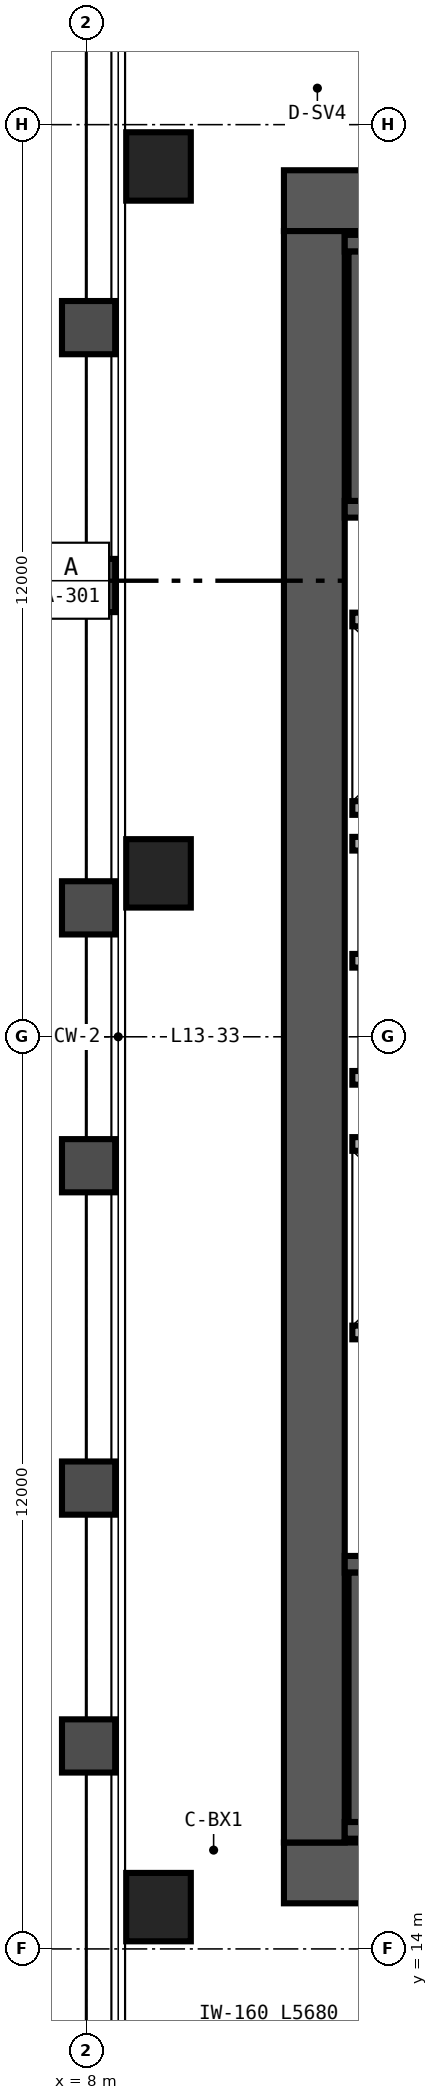
"""IFC4 building model, lengths in metres.
Left out: names, types, materials, properties, quantities, classifications, styles, units other than length and angle.
Written with IfcOpenShell. Run it as: python <this file> out.ifc"""

import sys

from ifc_helpers import new_model, si_unit, direction, frame, frame_2d, origin, origin_2d, place, context, subcontext, project, spatial, rectangle, hollow_rectangle, extrude, source, transform, mapped, element, save


model = new_model("IFC4")
c1 = context("Model", 3, precision=1e-05, world=origin(), true_north=direction((0.0, 1.0)))
c2 = subcontext(c1, "Body", "Model", "MODEL_VIEW")
j1 = project(units=[si_unit("LENGTHUNIT", "METRE"), si_unit("PLANEANGLEUNIT", "RADIAN")], contexts=[c1])
p1 = place(None, origin())
s1 = spatial("IfcSite", under=j1, at=p1, CompositionType="ELEMENT")
p2 = place(p1, origin())
s2 = spatial("IfcBuilding", under=s1, at=p2, CompositionType="ELEMENT")
p3 = place(p2, frame((0.0, 0.0, 56.4)))
s3 = spatial("IfcBuildingStorey", under=s2, at=p3, CompositionType="ELEMENT", Elevation=56.4)
p4 = place(p3, frame((10.6, 15.0, 0.0), z_axis=(0.0, 0.0, 1.0), x_axis=(1.0, 0.0, 0.0)))
e1 = element("IfcWall", 1, at=p4, inside=s3, PredefinedType="SHEAR", context=c2, shape_type="SweptSolid", body=[
    extrude(rectangle(XDim=12.8, YDim=0.8, at=frame_2d((6.4, 0.0))), origin(), (0.0, 0.0, 1.0), 3.35),
])
p5 = place(p4, frame((10.3, 0.0, 0.0)))
e2 = element("IfcOpeningElement", 2, at=p5, cuts=e1, PredefinedType="OPENING", context=c2, shape_type="SweptSolid", body=[
    extrude(rectangle(XDim=1.0, YDim=2.15, at=frame_2d((0.5, 1.075))), frame((0.0, 0.41, 0.0), z_axis=(0.0, -1.0, 0.0), x_axis=(1.0, 0.0, 0.0)), (0.0, 0.0, 1.0), 0.82),
])
p6 = place(p3, frame((10.6, 37.0, 0.0), z_axis=(0.0, 0.0, 1.0), x_axis=(1.0, 0.0, 0.0)))
e3 = element("IfcWall", 3, at=p6, inside=s3, PredefinedType="SHEAR", context=c2, shape_type="SweptSolid", body=[
    extrude(rectangle(XDim=12.8, YDim=0.8, at=frame_2d((6.4, 0.0))), origin(), (0.0, 0.0, 1.0), 3.35),
])
p7 = place(p6, frame((8.98, 0.0, 0.0)))
e4 = element("IfcOpeningElement", 4, at=p7, cuts=e3, PredefinedType="OPENING", context=c2, shape_type="SweptSolid", body=[
    extrude(rectangle(XDim=1.0, YDim=2.15, at=frame_2d((0.5, 1.075))), frame((0.0, 0.41, 0.0), z_axis=(0.0, -1.0, 0.0), x_axis=(1.0, 0.0, 0.0)), (0.0, 0.0, 1.0), 0.82),
])
p8 = place(p3, frame((11.0, 15.4, 0.0), z_axis=(0.0, 0.0, 1.0), x_axis=(0.0, 1.0, 0.0)))
e5 = element("IfcWall", 5, at=p8, inside=s3, PredefinedType="SHEAR", context=c2, shape_type="SweptSolid", body=[
    extrude(rectangle(XDim=21.2, YDim=0.8, at=frame_2d((10.6, 0.0))), origin(), (0.0, 0.0, 1.0), 3.35),
])
p9 = place(p3, frame((11.4, 15.56, 0.0), z_axis=(0.0, 0.0, 1.0), x_axis=(1.0, 0.0, 0.0)))
e6 = element("IfcWall", 6, at=p9, inside=s3, PredefinedType="SHEAR", context=c2, shape_type="SweptSolid", body=[
    extrude(rectangle(XDim=7.91, YDim=0.22, at=frame_2d((3.955, 0.0))), origin(), (0.0, 0.0, 1.0), 3.4),
])
p10 = place(p3, frame((11.4, 19.06, 0.0), z_axis=(0.0, 0.0, 1.0), x_axis=(1.0, 0.0, 0.0)))
e7 = element("IfcWall", 7, at=p10, inside=s3, PredefinedType="SHEAR", context=c2, shape_type="SweptSolid", body=[
    extrude(rectangle(XDim=7.91, YDim=0.22, at=frame_2d((3.955, 0.0))), origin(), (0.0, 0.0, 1.0), 3.4),
])
p11 = place(p10, frame((0.52, 0.0, 0.0)))
e8 = element("IfcOpeningElement", 8, at=p11, cuts=e7, PredefinedType="OPENING", context=c2, shape_type="SweptSolid", body=[
    extrude(rectangle(XDim=1.05, YDim=2.15, at=frame_2d((0.525, 1.075))), frame((0.0, 0.12, 0.0), z_axis=(0.0, -1.0, 0.0), x_axis=(1.0, 0.0, 0.0)), (0.0, 0.0, 1.0), 0.24),
])
p12 = place(p3, frame((11.56, 15.67, 0.0), z_axis=(0.0, 0.0, 1.0), x_axis=(0.0, 1.0, 0.0)))
e9 = element("IfcWall", 9, at=p12, inside=s3, PredefinedType="SHEAR", context=c2, shape_type="SweptSolid", body=[
    extrude(rectangle(XDim=3.28, YDim=0.22, at=frame_2d((1.64, 0.0))), origin(), (0.0, 0.0, 1.0), 3.4),
])
p13 = place(p3, frame((11.4, 32.94, 0.0), z_axis=(0.0, 0.0, 1.0), x_axis=(1.0, 0.0, 0.0)))
e10 = element("IfcWall", 10, at=p13, inside=s3, PredefinedType="SHEAR", context=c2, shape_type="SweptSolid", body=[
    extrude(rectangle(XDim=7.91, YDim=0.22, at=frame_2d((3.955, 0.0))), origin(), (0.0, 0.0, 1.0), 3.4),
])
p14 = place(p13, frame((0.52, 0.0, 0.0)))
e11 = element("IfcOpeningElement", 11, at=p14, cuts=e10, PredefinedType="OPENING", context=c2, shape_type="SweptSolid", body=[
    extrude(rectangle(XDim=1.05, YDim=2.15, at=frame_2d((0.525, 1.075))), frame((0.0, 0.12, 0.0), z_axis=(0.0, -1.0, 0.0), x_axis=(1.0, 0.0, 0.0)), (0.0, 0.0, 1.0), 0.24),
])
p15 = place(p3, frame((11.4, 36.44, 0.0), z_axis=(0.0, 0.0, 1.0), x_axis=(1.0, 0.0, 0.0)))
e12 = element("IfcWall", 12, at=p15, inside=s3, PredefinedType="SHEAR", context=c2, shape_type="SweptSolid", body=[
    extrude(rectangle(XDim=7.91, YDim=0.22, at=frame_2d((3.955, 0.0))), origin(), (0.0, 0.0, 1.0), 3.4),
])
p16 = place(p3, frame((11.56, 33.05, 0.0), z_axis=(0.0, 0.0, 1.0), x_axis=(0.0, 1.0, 0.0)))
e13 = element("IfcWall", 13, at=p16, inside=s3, PredefinedType="SHEAR", context=c2, shape_type="SweptSolid", body=[
    extrude(rectangle(XDim=3.28, YDim=0.22, at=frame_2d((1.64, 0.0))), origin(), (0.0, 0.0, 1.0), 3.4),
])
m1 = source(origin(), c2, "Body", "SweptSolid", [
    extrude(hollow_rectangle(XDim=0.85, YDim=0.9, WallThickness=0.04, at=origin_2d()), origin(), (0.0, 0.0, 1.0), 3.35),
])
for number, where, z_axis, x_axis in (
    (14, (8.95, 14.55, 0.0), (0.0, 0.0, 1.0), (1.0, 0.0, 0.0)),
    (15, (8.95, 28.15, 0.0), (0.0, 0.0, 1.0), (1.0, 0.0, 0.0)),
    (16, (8.95, 37.45, 0.0), (0.0, 0.0, 1.0), (1.0, 0.0, 0.0)),
):
    element("IfcColumn", number, at=place(p3, frame(where, z_axis=z_axis, x_axis=x_axis)), inside=s3, PredefinedType="COLUMN", context=c2, shape_type="MappedRepresentation", body=[
        mapped(m1, transform((0.0, 0.0, 0.0), scale=1.0)),
    ])
for number, where, z_axis, x_axis in (
    (17, (11.5, 22.11, 0.0), (0.0, 0.0, 1.0), (1.0, 0.0, 0.0)),
    (18, (11.5, 24.59, 0.0), (0.0, 0.0, 1.0), (1.0, 0.0, 0.0)),
    (19, (11.5, 29.01, 0.0), (0.0, 0.0, 1.0), (1.0, 0.0, 0.0)),
    (20, (11.5, 31.49, 0.0), (0.0, 0.0, 1.0), (1.0, 0.0, 0.0)),
):
    element("IfcWall", number, at=place(p3, frame(where, z_axis=z_axis, x_axis=x_axis)), inside=s3, PredefinedType="SOLIDWALL", context=c2, shape_type="SweptSolid", body=[
        extrude(rectangle(XDim=2.5, YDim=0.18, at=frame_2d((1.25, 0.0))), origin(), (0.0, 0.0, 1.0), 3.35),
    ])
for number, where, z_axis, x_axis in (
    (21, (11.5, 25.46, 0.0), (0.0, 0.0, 1.0), (1.0, 0.0, 0.0)),
    (22, (11.5, 27.0, 0.0), (0.0, 0.0, 1.0), (1.0, 0.0, 0.0)),
    (23, (11.5, 28.54, 0.0), (0.0, 0.0, 1.0), (1.0, 0.0, 0.0)),
):
    element("IfcWall", number, at=place(p3, frame(where, z_axis=z_axis, x_axis=x_axis)), inside=s3, PredefinedType="SOLIDWALL", context=c2, shape_type="SweptSolid", body=[
        extrude(rectangle(XDim=2.51, YDim=0.18, at=frame_2d((1.255, 0.0))), origin(), (0.0, 0.0, 1.0), 3.35),
    ])
save(model, sys.argv[1])
